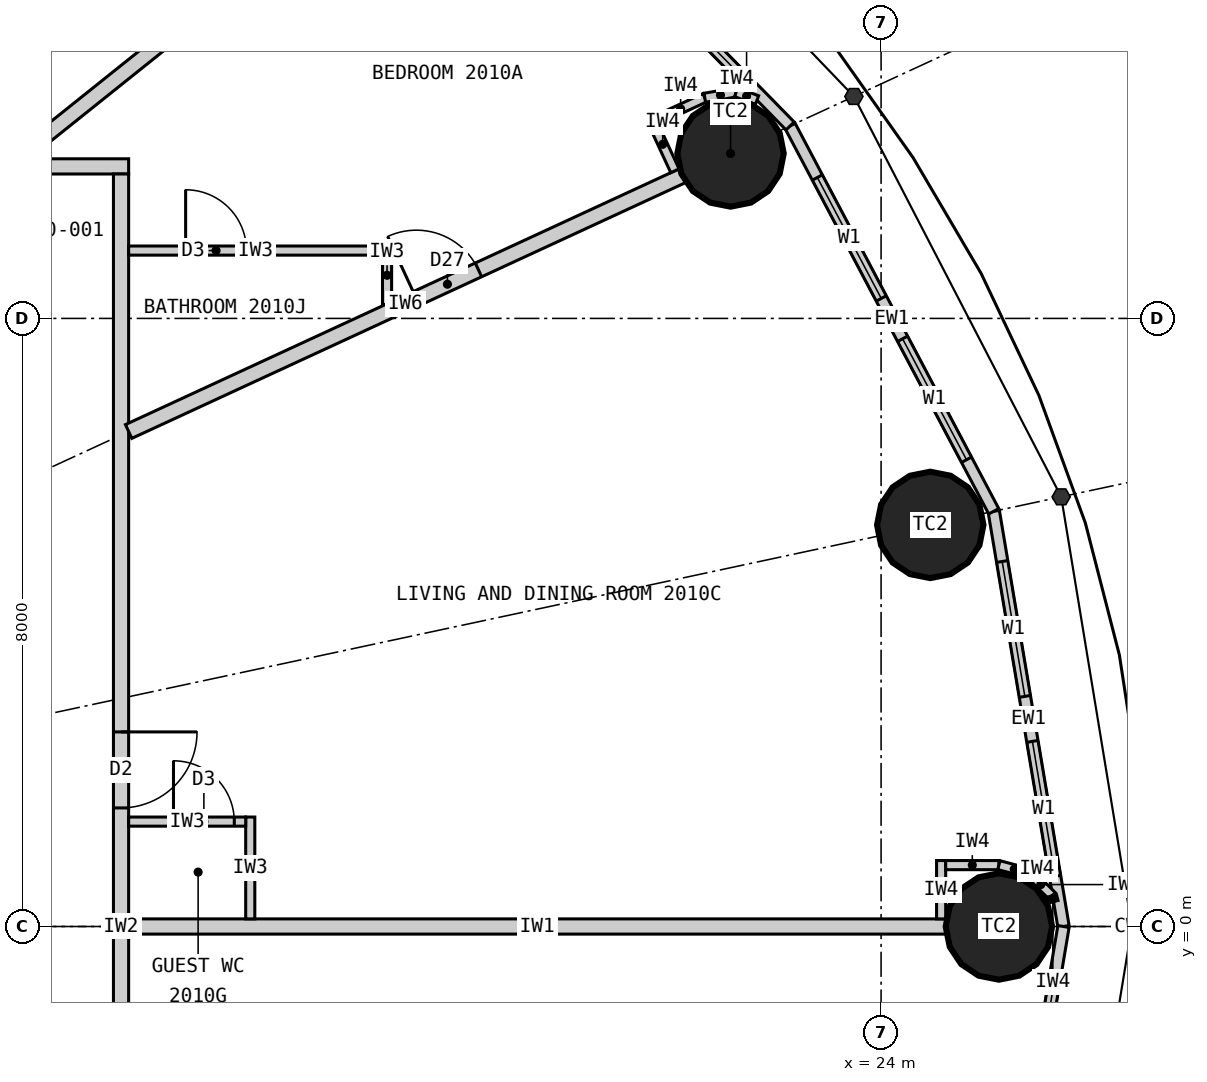
"""IFC4 building model, lengths in metres.
Left out: names, types, materials, properties, quantities, classifications, styles, units other than length and angle.
Written with IfcOpenShell. Run it as: python <this file> out.ifc"""

import sys

from ifc_helpers import new_model, si_unit, direction, frame, frame_2d, origin, origin_2d, place, context, subcontext, project, spatial, rectangle, circle, extrude, element, fill, save


model = new_model("IFC4")
c1 = context("Model", 3, precision=1e-05, world=origin(), true_north=direction((0.0, 1.0)))
c2 = subcontext(c1, "Body", "Model", "MODEL_VIEW")
j1 = project(units=[si_unit("LENGTHUNIT", "METRE"), si_unit("PLANEANGLEUNIT", "RADIAN")], contexts=[c1])
p1 = place(None, origin())
s1 = spatial("IfcSite", under=j1, at=p1, CompositionType="ELEMENT")
p2 = place(p1, origin())
s2 = spatial("IfcBuilding", under=s1, at=p2, CompositionType="ELEMENT")
p3 = place(p2, frame((0.0, 0.0, 80.4)))
s3 = spatial("IfcBuildingStorey", under=s2, at=p3, CompositionType="ELEMENT", Elevation=80.4)
for number, where, z_axis, x_axis in (
    (1, (25.55, 0.0, 0.0), (0.0, 0.0, 1.0), (1.0, 0.0, 0.0)),
    (2, (24.647, 5.283, 0.0), (0.0, 0.0, 1.0), (1.0, 0.0, 0.0)),
    (3, (22.019, 10.17, 0.0), (0.0, 0.0, 1.0), (1.0, 0.0, 0.0)),
):
    element("IfcColumn", number, at=place(p3, frame(where, z_axis=z_axis, x_axis=x_axis)), inside=s3, PredefinedType="COLUMN", context=c2, shape_type="SweptSolid", body=[
        extrude(circle(Radius=0.7, at=origin_2d()), origin(), (0.0, 0.0, 1.0), 3.3),
    ])
p4 = place(p3, frame((26.4, 0.0, 0.0), z_axis=(0.0, 0.0, 1.0), x_axis=(-0.165642551694, 0.986185857264, 0.0)))
e4 = element("IfcWall", 4, at=p4, inside=s3, PredefinedType="ELEMENTEDWALL", context=c2, shape_type="SweptSolid", body=[
    extrude(rectangle(XDim=5.539, YDim=0.15, at=frame_2d((2.77, 0.0))), origin(), (0.0, 0.0, 1.0), 3.12),
])
p5 = place(p4, frame((0.669, 0.0, 0.9)))
e5 = element("IfcOpeningElement", 5, at=p5, cuts=e4, PredefinedType="OPENING", context=c2, shape_type="SweptSolid", body=[
    extrude(rectangle(XDim=1.8, YDim=1.9, at=frame_2d((0.9, 0.95))), frame((0.0, 0.085, 0.0), z_axis=(0.0, -1.0, 0.0), x_axis=(1.0, 0.0, 0.0)), (0.0, 0.0, 1.0), 0.17),
])
p6 = place(p4, frame((3.07, 0.0, 0.9)))
e6 = element("IfcOpeningElement", 6, at=p6, cuts=e4, PredefinedType="OPENING", context=c2, shape_type="SweptSolid", body=[
    extrude(rectangle(XDim=1.8, YDim=1.9, at=frame_2d((0.9, 0.95))), frame((0.0, 0.085, 0.0), z_axis=(0.0, -1.0, 0.0), x_axis=(1.0, 0.0, 0.0)), (0.0, 0.0, 1.0), 0.17),
])
p7 = place(p3, frame((25.482, 5.462, 0.0), z_axis=(0.0, 0.0, 1.0), x_axis=(-0.467296867008, 0.884100468321, 0.0)))
e7 = element("IfcWall", 7, at=p7, inside=s3, PredefinedType="ELEMENTEDWALL", context=c2, shape_type="SweptSolid", body=[
    extrude(rectangle(XDim=5.734, YDim=0.15, at=frame_2d((2.867, 0.0))), origin(), (0.0, 0.0, 1.0), 3.12),
])
p8 = place(p7, frame((0.767, 0.0, 0.9)))
e8 = element("IfcOpeningElement", 8, at=p8, cuts=e7, PredefinedType="OPENING", context=c2, shape_type="SweptSolid", body=[
    extrude(rectangle(XDim=1.8, YDim=1.9, at=frame_2d((0.9, 0.95))), frame((0.0, 0.085, 0.0), z_axis=(0.0, -1.0, 0.0), x_axis=(1.0, 0.0, 0.0)), (0.0, 0.0, 1.0), 0.17),
])
p9 = place(p7, frame((3.167, 0.0, 0.9)))
e9 = element("IfcOpeningElement", 9, at=p9, cuts=e7, PredefinedType="OPENING", context=c2, shape_type="SweptSolid", body=[
    extrude(rectangle(XDim=1.8, YDim=1.9, at=frame_2d((0.9, 0.95))), frame((0.0, 0.085, 0.0), z_axis=(0.0, -1.0, 0.0), x_axis=(1.0, 0.0, 0.0)), (0.0, 0.0, 1.0), 0.17),
])
p10 = place(p3, frame((22.803, 10.532, 0.0), z_axis=(0.0, 0.0, 1.0), x_axis=(-0.699602905915, 0.714531856557, 0.0)))
e10 = element("IfcWall", 10, at=p10, inside=s3, PredefinedType="ELEMENTEDWALL", context=c2, shape_type="SweptSolid", body=[
    extrude(rectangle(XDim=6.051, YDim=0.15, at=frame_2d((3.025, 0.0))), origin(), (0.0, 0.0, 1.0), 3.12),
])
p11 = place(p10, frame((0.926, 0.0, 0.9)))
e11 = element("IfcOpeningElement", 11, at=p11, cuts=e10, PredefinedType="OPENING", context=c2, shape_type="SweptSolid", body=[
    extrude(rectangle(XDim=1.8, YDim=1.9, at=frame_2d((0.9, 0.95))), frame((0.0, 0.085, 0.0), z_axis=(0.0, -1.0, 0.0), x_axis=(1.0, 0.0, 0.0)), (0.0, 0.0, 1.0), 0.17),
])
p12 = place(p10, frame((3.325, 0.0, 0.9)))
e12 = element("IfcOpeningElement", 12, at=p12, cuts=e10, PredefinedType="OPENING", context=c2, shape_type="SweptSolid", body=[
    extrude(rectangle(XDim=1.8, YDim=1.9, at=frame_2d((0.9, 0.95))), frame((0.0, 0.085, 0.0), z_axis=(0.0, -1.0, 0.0), x_axis=(1.0, 0.0, 0.0)), (0.0, 0.0, 1.0), 0.17),
])
p13 = place(p3, frame((25.482, -5.462, 0.0), z_axis=(0.0, 0.0, 1.0), x_axis=(0.165642551694, 0.986185857264, 0.0)))
e13 = element("IfcWall", 13, at=p13, inside=s3, PredefinedType="ELEMENTEDWALL", context=c2, shape_type="SweptSolid", body=[
    extrude(rectangle(XDim=5.539, YDim=0.15, at=frame_2d((2.77, 0.0))), origin(), (0.0, 0.0, 1.0), 3.12),
])
p14 = place(p13, frame((0.669, 0.0, 0.9)))
e14 = element("IfcOpeningElement", 14, at=p14, cuts=e13, PredefinedType="OPENING", context=c2, shape_type="SweptSolid", body=[
    extrude(rectangle(XDim=1.8, YDim=1.9, at=frame_2d((0.9, 0.95))), frame((0.0, 0.085, 0.0), z_axis=(0.0, -1.0, 0.0), x_axis=(1.0, 0.0, 0.0)), (0.0, 0.0, 1.0), 0.17),
])
p15 = place(p13, frame((3.07, 0.0, 0.9)))
e15 = element("IfcOpeningElement", 15, at=p15, cuts=e13, PredefinedType="OPENING", context=c2, shape_type="SweptSolid", body=[
    extrude(rectangle(XDim=1.8, YDim=1.9, at=frame_2d((0.9, 0.95))), frame((0.0, 0.085, 0.0), z_axis=(0.0, -1.0, 0.0), x_axis=(1.0, 0.0, 0.0)), (0.0, 0.0, 1.0), 0.17),
])
p16 = place(p3, frame((-14.1, 10.0, 0.0), z_axis=(0.0, 0.0, 1.0), x_axis=(1.0, 0.0, 0.0)))
e16 = element("IfcWall", 16, at=p16, inside=s3, PredefinedType="PARTITIONING", context=c2, shape_type="SweptSolid", body=[
    extrude(rectangle(XDim=28.2, YDim=0.2, at=frame_2d((14.1, 0.0))), origin(), (0.0, 0.0, 1.0), 3.12),
])
p17 = place(p16, frame((23.865, 0.0, 0.0)))
e17 = element("IfcOpeningElement", 17, at=p17, cuts=e16, PredefinedType="OPENING", context=c2, shape_type="SweptSolid", body=[
    extrude(rectangle(XDim=1.0, YDim=2.2, at=frame_2d((0.5, 1.1))), frame((0.0, 0.11, 0.0), z_axis=(0.0, -1.0, 0.0), x_axis=(1.0, 0.0, 0.0)), (0.0, 0.0, 1.0), 0.22),
])
p18 = place(p16, frame((18.529, 0.0, 0.0)))
e18 = element("IfcOpeningElement", 18, at=p18, cuts=e16, PredefinedType="OPENING", context=c2, shape_type="SweptSolid", body=[
    extrude(rectangle(XDim=1.0, YDim=2.2, at=frame_2d((0.5, 1.1))), frame((0.0, 0.11, 0.0), z_axis=(0.0, -1.0, 0.0), x_axis=(1.0, 0.0, 0.0)), (0.0, 0.0, 1.0), 0.22),
])
p19 = place(p16, frame((14.623, 0.0, 0.0)))
e19 = element("IfcOpeningElement", 19, at=p19, cuts=e16, PredefinedType="OPENING", context=c2, shape_type="SweptSolid", body=[
    extrude(rectangle(XDim=1.0, YDim=2.2, at=frame_2d((0.5, 1.1))), frame((0.0, 0.11, 0.0), z_axis=(0.0, -1.0, 0.0), x_axis=(1.0, 0.0, 0.0)), (0.0, 0.0, 1.0), 0.22),
])
p20 = place(p16, frame((11.24, 0.0, 0.0)))
e20 = element("IfcOpeningElement", 20, at=p20, cuts=e16, PredefinedType="OPENING", context=c2, shape_type="SweptSolid", body=[
    extrude(rectangle(XDim=1.0, YDim=2.2, at=frame_2d((0.5, 1.1))), frame((0.0, 0.11, 0.0), z_axis=(0.0, -1.0, 0.0), x_axis=(1.0, 0.0, 0.0)), (0.0, 0.0, 1.0), 0.22),
])
p21 = place(p16, frame((8.671, 0.0, 0.0)))
e21 = element("IfcOpeningElement", 21, at=p21, cuts=e16, PredefinedType="OPENING", context=c2, shape_type="SweptSolid", body=[
    extrude(rectangle(XDim=1.0, YDim=2.2, at=frame_2d((0.5, 1.1))), frame((0.0, 0.11, 0.0), z_axis=(0.0, -1.0, 0.0), x_axis=(1.0, 0.0, 0.0)), (0.0, 0.0, 1.0), 0.22),
])
p22 = place(p16, frame((2.801, 0.0, 0.0)))
e22 = element("IfcOpeningElement", 22, at=p22, cuts=e16, PredefinedType="OPENING", context=c2, shape_type="SweptSolid", body=[
    extrude(rectangle(XDim=1.0, YDim=2.2, at=frame_2d((0.5, 1.1))), frame((0.0, 0.11, 0.0), z_axis=(0.0, -1.0, 0.0), x_axis=(1.0, 0.0, 0.0)), (0.0, 0.0, 1.0), 0.22),
])
p23 = place(p3, frame((14.0, -9.9, 0.0), z_axis=(0.0, 0.0, 1.0), x_axis=(0.0, 1.0, 0.0)))
e23 = element("IfcWall", 23, at=p23, inside=s3, PredefinedType="PARTITIONING", context=c2, shape_type="SweptSolid", body=[
    extrude(rectangle(XDim=19.8, YDim=0.2, at=frame_2d((9.9, 0.0))), origin(), (0.0, 0.0, 1.0), 3.12),
])
p24 = place(p23, frame((5.948, 0.0, 0.0)))
e24 = element("IfcOpeningElement", 24, at=p24, cuts=e23, PredefinedType="OPENING", context=c2, shape_type="SweptSolid", body=[
    extrude(rectangle(XDim=1.0, YDim=2.2, at=frame_2d((0.5, 1.1))), frame((0.0, 0.11, 0.0), z_axis=(0.0, -1.0, 0.0), x_axis=(1.0, 0.0, 0.0)), (0.0, 0.0, 1.0), 0.22),
])
p25 = place(p23, frame((11.46, 0.0, 0.0)))
e25 = element("IfcOpeningElement", 25, at=p25, cuts=e23, PredefinedType="OPENING", context=c2, shape_type="SweptSolid", body=[
    extrude(rectangle(XDim=1.0, YDim=2.2, at=frame_2d((0.5, 1.1))), frame((0.0, 0.11, 0.0), z_axis=(0.0, -1.0, 0.0), x_axis=(1.0, 0.0, 0.0)), (0.0, 0.0, 1.0), 0.22),
])
p26 = place(p3, frame((14.1, 0.0, 0.0), z_axis=(0.0, 0.0, 1.0), x_axis=(1.0, 0.0, 0.0)))
e26 = element("IfcWall", 26, at=p26, inside=s3, PredefinedType="PARTITIONING", context=c2, shape_type="SweptSolid", body=[
    extrude(rectangle(XDim=10.75, YDim=0.2, at=frame_2d((5.375, 0.0))), origin(), (0.0, 0.0, 1.0), 2.27),
])
p27 = place(p3, frame((14.1, 6.512, 0.0), z_axis=(0.0, 0.0, 1.0), x_axis=(0.907832871056, 0.419332181247, 0.0)))
e27 = element("IfcWall", 27, at=p27, inside=s3, PredefinedType="PARTITIONING", context=c2, shape_type="SweptSolid", body=[
    extrude(rectangle(XDim=8.023, YDim=0.2, at=frame_2d((4.011, 0.0))), origin(), (0.0, 0.0, 1.0), 2.32),
])
p28 = place(p27, frame((4.17, 0.0, 0.0)))
e28 = element("IfcOpeningElement", 28, at=p28, cuts=e27, PredefinedType="OPENING", context=c2, shape_type="SweptSolid", body=[
    extrude(rectangle(XDim=0.9, YDim=2.1, at=frame_2d((0.45, 1.05))), frame((0.0, 0.11, 0.0), z_axis=(0.0, -1.0, 0.0), x_axis=(1.0, 0.0, 0.0)), (0.0, 0.0, 1.0), 0.22),
])
p29 = place(p3, frame((12.625, 10.1, 0.0), z_axis=(0.0, 0.0, 1.0), x_axis=(0.780892451574, 0.624665493744, 0.0)))
e29 = element("IfcWall", 29, at=p29, inside=s3, PredefinedType="PARTITIONING", context=c2, shape_type="SweptSolid", body=[
    extrude(rectangle(XDim=6.045, YDim=0.2, at=frame_2d((3.022, 0.0))), origin(), (0.0, 0.0, 1.0), 2.32),
])
p30 = place(p3, frame((15.7, 0.1, 0.0), z_axis=(0.0, 0.0, 1.0), x_axis=(0.0, 1.0, 0.0)))
e30 = element("IfcWall", 30, at=p30, inside=s3, PredefinedType="PARTITIONING", context=c2, shape_type="SweptSolid", body=[
    extrude(rectangle(XDim=1.34, YDim=0.12, at=frame_2d((0.67, 0.0))), origin(), (0.0, 0.0, 1.0), 3.12),
])
p31 = place(p3, frame((14.1, 1.38, 0.0), z_axis=(0.0, 0.0, 1.0), x_axis=(1.0, 0.0, 0.0)))
e31 = element("IfcWall", 31, at=p31, inside=s3, PredefinedType="PARTITIONING", context=c2, shape_type="SweptSolid", body=[
    extrude(rectangle(XDim=1.54, YDim=0.12, at=frame_2d((0.77, 0.0))), origin(), (0.0, 0.0, 1.0), 2.32),
])
p32 = place(p31, frame((0.59, 0.0, 0.0)))
e32 = element("IfcOpeningElement", 32, at=p32, cuts=e31, PredefinedType="OPENING", context=c2, shape_type="SweptSolid", body=[
    extrude(rectangle(XDim=0.8, YDim=2.1, at=frame_2d((0.4, 1.05))), frame((0.0, 0.07, 0.0), z_axis=(0.0, -1.0, 0.0), x_axis=(1.0, 0.0, 0.0)), (0.0, 0.0, 1.0), 0.14),
])
p33 = place(p3, frame((17.5, 8.183, 0.0), z_axis=(0.0, 0.0, 1.0), x_axis=(0.0, 1.0, 0.0)))
e33 = element("IfcWall", 33, at=p33, inside=s3, PredefinedType="PARTITIONING", context=c2, shape_type="SweptSolid", body=[
    extrude(rectangle(XDim=0.77, YDim=0.12, at=frame_2d((0.385, 0.0))), origin(), (0.0, 0.0, 1.0), 3.12),
])
p34 = place(p3, frame((14.1, 8.893, 0.0), z_axis=(0.0, 0.0, 1.0), x_axis=(1.0, 0.0, 0.0)))
e34 = element("IfcWall", 34, at=p34, inside=s3, PredefinedType="PARTITIONING", context=c2, shape_type="SweptSolid", body=[
    extrude(rectangle(XDim=3.34, YDim=0.12, at=frame_2d((1.67, 0.0))), origin(), (0.0, 0.0, 1.0), 3.12),
])
p35 = place(p34, frame((0.75, 0.0, 0.0)))
e35 = element("IfcOpeningElement", 35, at=p35, cuts=e34, PredefinedType="OPENING", context=c2, shape_type="SweptSolid", body=[
    extrude(rectangle(XDim=0.8, YDim=2.1, at=frame_2d((0.4, 1.05))), frame((0.0, 0.07, 0.0), z_axis=(0.0, -1.0, 0.0), x_axis=(1.0, 0.0, 0.0)), (0.0, 0.0, 1.0), 0.14),
])
p36 = place(p3, frame((24.79, 0.1, 0.0), z_axis=(0.0, 0.0, 1.0), x_axis=(0.0, 1.0, 0.0)))
e36 = element("IfcWall", 36, at=p36, inside=s3, PredefinedType="PARTITIONING", context=c2, shape_type="SweptSolid", body=[
    extrude(rectangle(XDim=0.767, YDim=0.12, at=frame_2d((0.384, 0.0))), origin(), (0.0, 0.0, 1.0), 3.12),
])
p37 = place(p3, frame((24.85, 0.808, 0.0), z_axis=(0.0, 0.0, 1.0), x_axis=(1.0, 0.0, 0.0)))
e37 = element("IfcWall", 37, at=p37, inside=s3, PredefinedType="PARTITIONING", context=c2, shape_type="SweptSolid", body=[
    extrude(rectangle(XDim=0.7, YDim=0.12, at=frame_2d((0.35, 0.0))), origin(), (0.0, 0.0, 1.0), 3.12),
])
p38 = place(p3, frame((25.55, 0.808, 0.0), z_axis=(0.0, 0.0, 1.0), x_axis=(0.965807183573, -0.2592614205, 0.0)))
e38 = element("IfcWall", 38, at=p38, inside=s3, PredefinedType="PARTITIONING", context=c2, shape_type="SweptSolid", body=[
    extrude(rectangle(XDim=0.418, YDim=0.12, at=frame_2d((0.209, 0.0))), origin(), (0.0, 0.0, 1.0), 3.12),
])
p39 = place(p3, frame((25.954, 0.699, 0.0), z_axis=(0.0, 0.0, 1.0), x_axis=(0.707106781187, -0.707106781187, 0.0)))
e39 = element("IfcWall", 39, at=p39, inside=s3, PredefinedType="PARTITIONING", context=c2, shape_type="SweptSolid", body=[
    extrude(rectangle(XDim=0.418, YDim=0.12, at=frame_2d((0.209, 0.0))), origin(), (0.0, 0.0, 1.0), 3.12),
])
p40 = place(p3, frame((26.249, 0.404, 0.0), z_axis=(0.0, 0.0, 1.0), x_axis=(0.259754282609, -0.965674744759, 0.0)))
e40 = element("IfcWall", 40, at=p40, inside=s3, PredefinedType="PARTITIONING", context=c2, shape_type="SweptSolid", body=[
    extrude(rectangle(XDim=0.08, YDim=0.12, at=frame_2d((0.04, 0.0))), origin(), (0.0, 0.0, 1.0), 3.12),
])
p41 = place(p3, frame((21.287, 9.942, 0.0), z_axis=(0.0, 0.0, 1.0), x_axis=(-0.419259891039, 0.907866258744, 0.0)))
e41 = element("IfcWall", 41, at=p41, inside=s3, PredefinedType="PARTITIONING", context=c2, shape_type="SweptSolid", body=[
    extrude(rectangle(XDim=0.768, YDim=0.12, at=frame_2d((0.384, 0.0))), origin(), (0.0, 0.0, 1.0), 3.12),
])
p42 = place(p3, frame((21.045, 10.61, 0.0), z_axis=(0.0, 0.0, 1.0), x_axis=(0.907877701396, 0.419235112208, 0.0)))
e42 = element("IfcWall", 42, at=p42, inside=s3, PredefinedType="PARTITIONING", context=c2, shape_type="SweptSolid", body=[
    extrude(rectangle(XDim=0.7, YDim=0.12, at=frame_2d((0.35, 0.0))), origin(), (0.0, 0.0, 1.0), 3.12),
])
p43 = place(p3, frame((21.68, 10.903, 0.0), z_axis=(0.0, 0.0, 1.0), x_axis=(0.985446622073, 0.169985161247, 0.0)))
e43 = element("IfcWall", 43, at=p43, inside=s3, PredefinedType="PARTITIONING", context=c2, shape_type="SweptSolid", body=[
    extrude(rectangle(XDim=0.418, YDim=0.12, at=frame_2d((0.209, 0.0))), origin(), (0.0, 0.0, 1.0), 3.12),
])
p44 = place(p3, frame((22.092, 10.974, 0.0), z_axis=(0.0, 0.0, 1.0), x_axis=(0.938428160676, -0.345474437912, 0.0)))
e44 = element("IfcWall", 44, at=p44, inside=s3, PredefinedType="PARTITIONING", context=c2, shape_type="SweptSolid", body=[
    extrude(rectangle(XDim=0.294, YDim=0.12, at=frame_2d((0.147, 0.0))), origin(), (0.0, 0.0, 1.0), 3.12),
])
p45 = place(p5, origin())
e45 = element("IfcWindow", 45, at=p45, inside=s3, PartitioningType="SINGLE_PANEL", PredefinedType="WINDOW", context=c2, shape_type="SweptSolid", body=[
    extrude(rectangle(XDim=1.8, YDim=1.9, at=frame_2d((0.9, 0.95))), frame((0.0, 0.03, 0.0), z_axis=(0.0, -1.0, 0.0), x_axis=(1.0, 0.0, 0.0)), (0.0, 0.0, 1.0), 0.06),
])
fill(e5, e45)
p46 = place(p6, origin())
e46 = element("IfcWindow", 46, at=p46, inside=s3, PartitioningType="SINGLE_PANEL", PredefinedType="WINDOW", context=c2, shape_type="SweptSolid", body=[
    extrude(rectangle(XDim=1.8, YDim=1.9, at=frame_2d((0.9, 0.95))), frame((0.0, 0.03, 0.0), z_axis=(0.0, -1.0, 0.0), x_axis=(1.0, 0.0, 0.0)), (0.0, 0.0, 1.0), 0.06),
])
fill(e6, e46)
p47 = place(p8, origin())
e47 = element("IfcWindow", 47, at=p47, inside=s3, PartitioningType="SINGLE_PANEL", PredefinedType="WINDOW", context=c2, shape_type="SweptSolid", body=[
    extrude(rectangle(XDim=1.8, YDim=1.9, at=frame_2d((0.9, 0.95))), frame((0.0, 0.03, 0.0), z_axis=(0.0, -1.0, 0.0), x_axis=(1.0, 0.0, 0.0)), (0.0, 0.0, 1.0), 0.06),
])
fill(e8, e47)
p48 = place(p9, origin())
e48 = element("IfcWindow", 48, at=p48, inside=s3, PartitioningType="SINGLE_PANEL", PredefinedType="WINDOW", context=c2, shape_type="SweptSolid", body=[
    extrude(rectangle(XDim=1.8, YDim=1.9, at=frame_2d((0.9, 0.95))), frame((0.0, 0.03, 0.0), z_axis=(0.0, -1.0, 0.0), x_axis=(1.0, 0.0, 0.0)), (0.0, 0.0, 1.0), 0.06),
])
fill(e9, e48)
p49 = place(p11, origin())
e49 = element("IfcWindow", 49, at=p49, inside=s3, PartitioningType="SINGLE_PANEL", PredefinedType="WINDOW", context=c2, shape_type="SweptSolid", body=[
    extrude(rectangle(XDim=1.8, YDim=1.9, at=frame_2d((0.9, 0.95))), frame((0.0, 0.03, 0.0), z_axis=(0.0, -1.0, 0.0), x_axis=(1.0, 0.0, 0.0)), (0.0, 0.0, 1.0), 0.06),
])
fill(e11, e49)
p50 = place(p15, origin())
e50 = element("IfcWindow", 50, at=p50, inside=s3, PartitioningType="SINGLE_PANEL", PredefinedType="WINDOW", context=c2, shape_type="SweptSolid", body=[
    extrude(rectangle(XDim=1.8, YDim=1.9, at=frame_2d((0.9, 0.95))), frame((0.0, 0.03, 0.0), z_axis=(0.0, -1.0, 0.0), x_axis=(1.0, 0.0, 0.0)), (0.0, 0.0, 1.0), 0.06),
])
fill(e15, e50)
p51 = place(p32, origin())
e51 = element("IfcDoor", 51, at=p51, inside=s3, OperationType="SINGLE_SWING_LEFT", PredefinedType="DOOR", context=c2, shape_type="SweptSolid", body=[
    extrude(rectangle(XDim=0.8, YDim=2.1, at=frame_2d((0.4, 1.05))), frame((0.0, 0.025, 0.0), z_axis=(0.0, -1.0, 0.0), x_axis=(1.0, 0.0, 0.0)), (0.0, 0.0, 1.0), 0.05),
])
fill(e32, e51)
p52 = place(p25, origin())
e52 = element("IfcDoor", 52, at=p52, inside=s3, OperationType="SINGLE_SWING_RIGHT", PredefinedType="DOOR", context=c2, shape_type="SweptSolid", body=[
    extrude(rectangle(XDim=1.0, YDim=2.2, at=frame_2d((0.5, 1.1))), frame((0.0, 0.025, 0.0), z_axis=(0.0, -1.0, 0.0), x_axis=(1.0, 0.0, 0.0)), (0.0, 0.0, 1.0), 0.05),
])
fill(e25, e52)
p53 = place(p35, origin())
e53 = element("IfcDoor", 53, at=p53, inside=s3, OperationType="SINGLE_SWING_LEFT", PredefinedType="DOOR", context=c2, shape_type="SweptSolid", body=[
    extrude(rectangle(XDim=0.8, YDim=2.1, at=frame_2d((0.4, 1.05))), frame((0.0, 0.025, 0.0), z_axis=(0.0, -1.0, 0.0), x_axis=(1.0, 0.0, 0.0)), (0.0, 0.0, 1.0), 0.05),
])
fill(e35, e53)
p54 = place(p28, origin())
e54 = element("IfcDoor", 54, at=p54, inside=s3, OperationType="SINGLE_SWING_LEFT", PredefinedType="DOOR", context=c2, shape_type="SweptSolid", body=[
    extrude(rectangle(XDim=0.9, YDim=2.1, at=frame_2d((0.45, 1.05))), frame((0.0, 0.025, 0.0), z_axis=(0.0, -1.0, 0.0), x_axis=(1.0, 0.0, 0.0)), (0.0, 0.0, 1.0), 0.05),
])
fill(e28, e54)
save(model, sys.argv[1])
